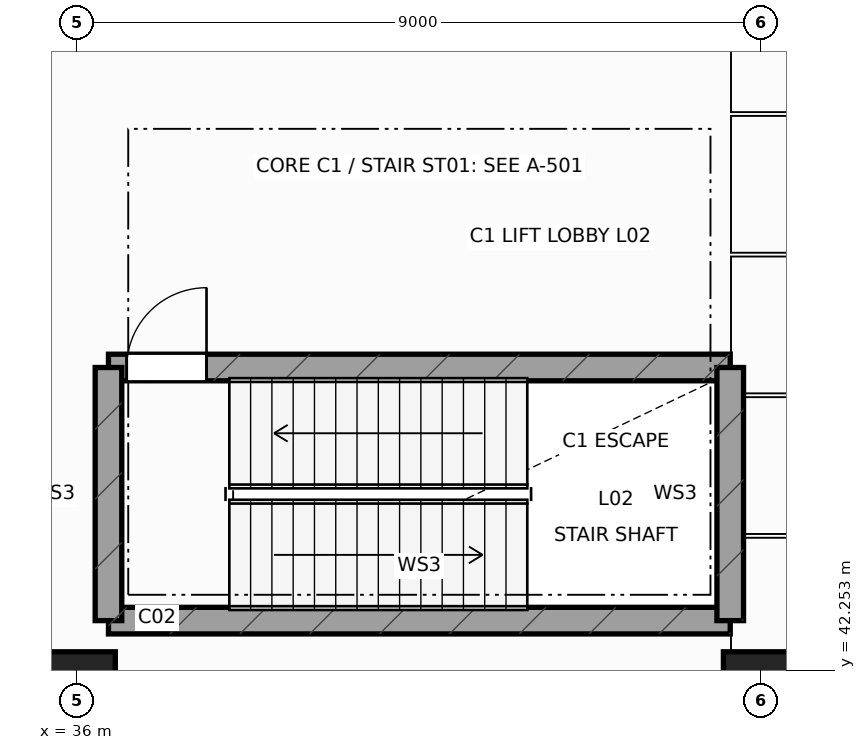
"""IFC4 building model, lengths in metres.
Left out: names, types, materials, properties, quantities, classifications, styles, units other than length and angle.
Written with IfcOpenShell. Run it as: python <this file> out.ifc"""

import sys

from ifc_helpers import new_model, si_unit, direction, frame, frame_2d, origin, origin_2d, place, context, subcontext, project, spatial, rectangle, extrude, element, fill, save


model = new_model("IFC4")
c1 = context("Model", 3, precision=1e-05, world=origin(), true_north=direction((0.0, 1.0)))
c2 = subcontext(c1, "Body", "Model", "MODEL_VIEW")
j1 = project(units=[si_unit("LENGTHUNIT", "METRE"), si_unit("PLANEANGLEUNIT", "RADIAN")], contexts=[c1])
p1 = place(None, origin())
s1 = spatial("IfcSite", under=j1, at=p1, CompositionType="ELEMENT")
p2 = place(p1, origin())
s2 = spatial("IfcBuilding", under=s1, at=p2, CompositionType="ELEMENT")
p3 = place(p2, frame((0.0, 0.0, 11.4)))
s3 = spatial("IfcBuildingStorey", under=s2, at=p3, CompositionType="ELEMENT", Elevation=11.4)
for number, where, z_axis, x_axis in (
    (1, (36.0, 42.0, 0.0), (0.0, 0.0, 1.0), (1.0, 0.0, 0.0)),
    (2, (45.0, 42.0, 0.0), (0.0, 0.0, 1.0), (1.0, 0.0, 0.0)),
):
    element("IfcColumn", number, at=place(p3, frame(where, z_axis=z_axis, x_axis=x_axis)), inside=s3, PredefinedType="COLUMN", context=c2, shape_type="SweptSolid", body=[
        extrude(rectangle(XDim=1.0, YDim=1.0, at=origin_2d()), origin(), (0.0, 0.0, 1.0), 5.4),
    ])
p4 = place(p3, frame((36.41, 42.91, 0.0), z_axis=(0.0, 0.0, 1.0), x_axis=(1.0, 0.0, 0.0)))
e3 = element("IfcWall", 3, at=p4, inside=s3, PredefinedType="SHEAR", context=c2, shape_type="SweptSolid", body=[
    extrude(rectangle(XDim=8.18, YDim=0.35, at=frame_2d((4.09, 0.0))), origin(), (0.0, 0.0, 1.0), 5.12),
])
p5 = place(p3, frame((36.41, 46.24, 0.0), z_axis=(0.0, 0.0, 1.0), x_axis=(1.0, 0.0, 0.0)))
e4 = element("IfcWall", 4, at=p5, inside=s3, PredefinedType="SHEAR", context=c2, shape_type="SweptSolid", body=[
    extrude(rectangle(XDim=8.18, YDim=0.35, at=frame_2d((4.09, 0.0))), origin(), (0.0, 0.0, 1.0), 5.12),
])
p6 = place(p5, frame((0.24, 0.0, 0.0)))
e5 = element("IfcOpeningElement", 5, at=p6, cuts=e4, PredefinedType="OPENING", context=c2, shape_type="SweptSolid", body=[
    extrude(rectangle(XDim=1.05, YDim=2.18, at=frame_2d((0.525, 1.09))), frame((0.0, 0.185, 0.0), z_axis=(0.0, -1.0, 0.0), x_axis=(1.0, 0.0, 0.0)), (0.0, 0.0, 1.0), 0.37),
])
for number, where, z_axis, x_axis in (
    (6, (36.41, 42.91, 0.0), (0.0, 0.0, 1.0), (0.0, 1.0, 0.0)),
    (7, (44.59, 42.91, 0.0), (0.0, 0.0, 1.0), (0.0, 1.0, 0.0)),
):
    element("IfcWall", number, at=place(p3, frame(where, z_axis=z_axis, x_axis=x_axis)), inside=s3, PredefinedType="SHEAR", context=c2, shape_type="SweptSolid", body=[
        extrude(rectangle(XDim=3.33, YDim=0.35, at=frame_2d((1.665, 0.0))), origin(), (0.0, 0.0, 1.0), 5.12),
    ])
p7 = place(p6, origin())
e8 = element("IfcDoor", 8, at=p7, inside=s3, OperationType="SINGLE_SWING_RIGHT", PredefinedType="DOOR", context=c2, shape_type="SweptSolid", body=[
    extrude(rectangle(XDim=1.05, YDim=2.18, at=frame_2d((0.525, 1.09))), frame((0.0, 0.025, 0.0), z_axis=(0.0, -1.0, 0.0), x_axis=(1.0, 0.0, 0.0)), (0.0, 0.0, 1.0), 0.05),
])
fill(e5, e8)
save(model, sys.argv[1])
